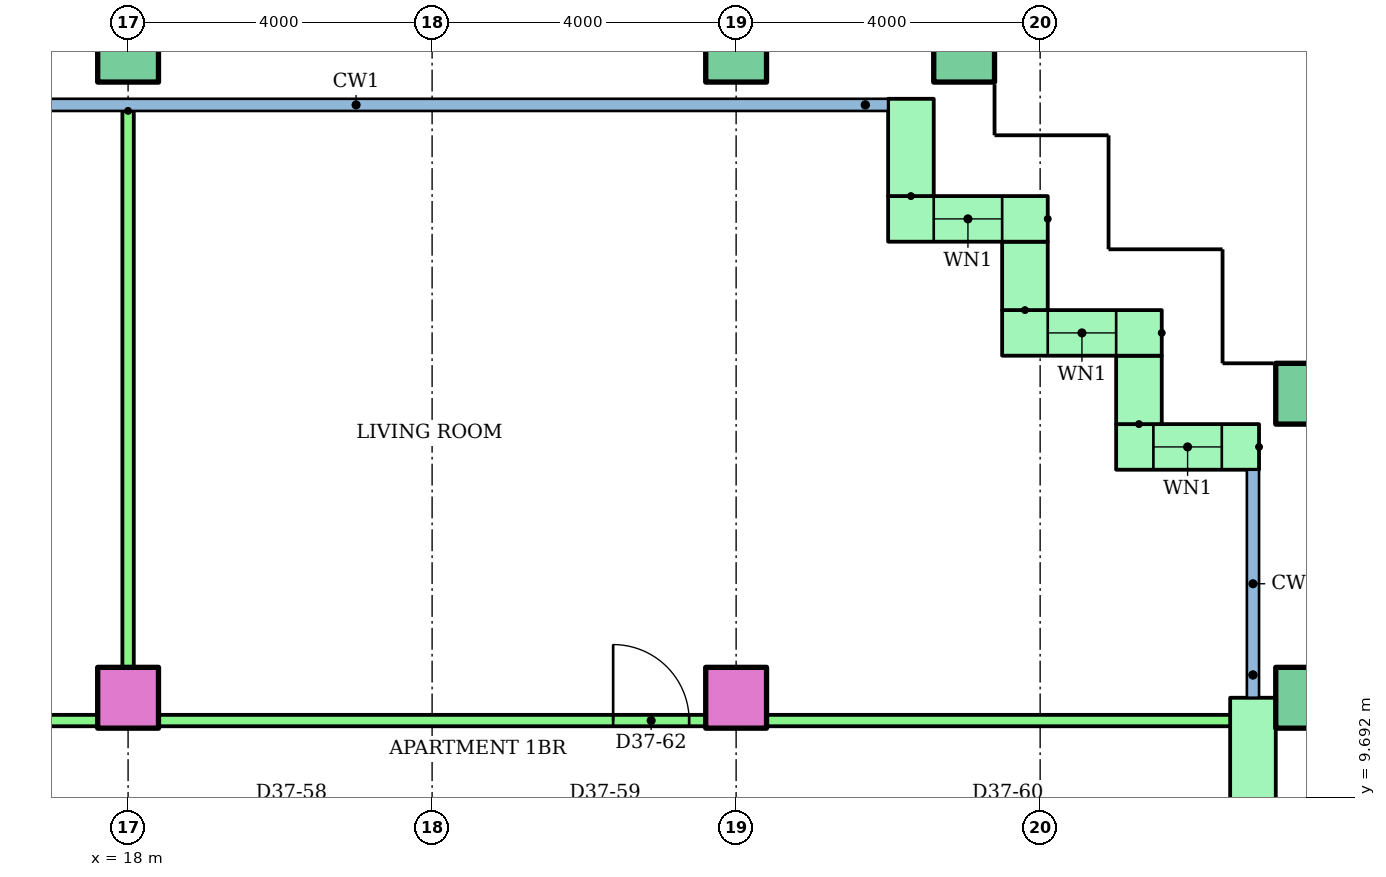
"""IFC4 building model, lengths in metres.
Left out: names, types, materials, properties, quantities, classifications, styles, units other than length and angle.
Written with IfcOpenShell. Run it as: python <this file> out.ifc"""

import sys

from ifc_helpers import new_model, si_unit, direction, frame, frame_2d, origin, origin_2d, place, context, subcontext, project, spatial, rectangle, hollow_rectangle, extrude, element, fill, save


model = new_model("IFC4")
c1 = context("Model", 3, precision=1e-05, world=origin(), true_north=direction((0.0, 1.0)))
c2 = subcontext(c1, "Body", "Model", "MODEL_VIEW")
j1 = project(units=[si_unit("LENGTHUNIT", "METRE"), si_unit("PLANEANGLEUNIT", "RADIAN")], contexts=[c1])
p1 = place(None, origin())
s1 = spatial("IfcSite", under=j1, at=p1, CompositionType="ELEMENT")
p2 = place(p1, origin())
s2 = spatial("IfcBuilding", under=s1, at=p2, CompositionType="ELEMENT")
p3 = place(p2, frame((0.0, 0.0, 142.2)))
s3 = spatial("IfcBuildingStorey", under=s2, at=p3, CompositionType="ELEMENT", Elevation=142.2)
for number, where in (
    (1, (18.0, 11.0, 0.0)),
    (2, (26.0, 11.0, 0.0)),
):
    element("IfcColumn", number, at=place(p3, frame(where)), inside=s3, PredefinedType="COLUMN", context=c2, shape_type="SweptSolid", body=[
        extrude(rectangle(XDim=0.8, YDim=0.8, at=origin_2d()), origin(), (0.0, 0.0, 1.0), 3.2),
    ])
for number, where in (
    (3, (33.5, 11.0, 0.0)),
    (4, (33.5, 15.0, 0.0)),
    (5, (18.0, 19.5, 0.0)),
    (6, (26.0, 19.5, 0.0)),
    (7, (29.0, 19.5, 0.0)),
):
    element("IfcColumn", number, at=place(p3, frame(where)), inside=s3, PredefinedType="COLUMN", context=c2, shape_type="SweptSolid", body=[
        extrude(hollow_rectangle(XDim=0.8, YDim=0.8, WallThickness=0.04, at=origin_2d()), origin(), (0.0, 0.0, 1.0), 3.2),
    ])
p4 = place(p3, frame((32.88, 14.3, 0.0), z_axis=(0.0, 0.0, 1.0), x_axis=(-1.0, 0.0, 0.0)))
e8 = element("IfcWall", 8, at=p4, inside=s3, PredefinedType="STANDARD", context=c2, shape_type="SweptSolid", body=[
    extrude(rectangle(XDim=1.88, YDim=0.6, at=frame_2d((0.94, 0.0))), origin(), (0.0, 0.0, 1.0), 2.92),
])
p5 = place(p4, frame((0.49, 0.0, 0.9)))
e9 = element("IfcOpeningElement", 9, at=p5, cuts=e8, PredefinedType="OPENING", context=c2, shape_type="SweptSolid", body=[
    extrude(rectangle(XDim=0.9, YDim=1.5, at=frame_2d((0.45, 0.75))), frame((0.0, 0.31, 0.0), z_axis=(0.0, -1.0, 0.0), x_axis=(1.0, 0.0, 0.0)), (0.0, 0.0, 1.0), 0.62),
])
p6 = place(p3, frame((31.3, 14.6, 0.0), z_axis=(0.0, 0.0, 1.0), x_axis=(0.0, 1.0, 0.0)))
e10 = element("IfcWall", 10, at=p6, inside=s3, PredefinedType="STANDARD", context=c2, shape_type="SweptSolid", body=[
    extrude(rectangle(XDim=0.9, YDim=0.6, at=frame_2d((0.45, 0.0))), origin(), (0.0, 0.0, 1.0), 2.92),
])
p7 = place(p3, frame((31.6, 15.8, 0.0), z_axis=(0.0, 0.0, 1.0), x_axis=(-1.0, 0.0, 0.0)))
e11 = element("IfcWall", 11, at=p7, inside=s3, PredefinedType="STANDARD", context=c2, shape_type="SweptSolid", body=[
    extrude(rectangle(XDim=2.1, YDim=0.6, at=frame_2d((1.05, 0.0))), origin(), (0.0, 0.0, 1.0), 2.92),
])
p8 = place(p7, frame((0.6, 0.0, 0.9)))
e12 = element("IfcOpeningElement", 12, at=p8, cuts=e11, PredefinedType="OPENING", context=c2, shape_type="SweptSolid", body=[
    extrude(rectangle(XDim=0.9, YDim=1.5, at=frame_2d((0.45, 0.75))), frame((0.0, 0.31, 0.0), z_axis=(0.0, -1.0, 0.0), x_axis=(1.0, 0.0, 0.0)), (0.0, 0.0, 1.0), 0.62),
])
p9 = place(p3, frame((29.8, 16.1, 0.0), z_axis=(0.0, 0.0, 1.0), x_axis=(0.0, 1.0, 0.0)))
e13 = element("IfcWall", 13, at=p9, inside=s3, PredefinedType="STANDARD", context=c2, shape_type="SweptSolid", body=[
    extrude(rectangle(XDim=0.9, YDim=0.6, at=frame_2d((0.45, 0.0))), origin(), (0.0, 0.0, 1.0), 2.92),
])
p10 = place(p3, frame((30.1, 17.3, 0.0), z_axis=(0.0, 0.0, 1.0), x_axis=(-1.0, 0.0, 0.0)))
e14 = element("IfcWall", 14, at=p10, inside=s3, PredefinedType="STANDARD", context=c2, shape_type="SweptSolid", body=[
    extrude(rectangle(XDim=2.1, YDim=0.6, at=frame_2d((1.05, 0.0))), origin(), (0.0, 0.0, 1.0), 2.92),
])
p11 = place(p10, frame((0.6, 0.0, 0.9)))
e15 = element("IfcOpeningElement", 15, at=p11, cuts=e14, PredefinedType="OPENING", context=c2, shape_type="SweptSolid", body=[
    extrude(rectangle(XDim=0.9, YDim=1.5, at=frame_2d((0.45, 0.75))), frame((0.0, 0.31, 0.0), z_axis=(0.0, -1.0, 0.0), x_axis=(1.0, 0.0, 0.0)), (0.0, 0.0, 1.0), 0.62),
])
p12 = place(p3, frame((28.3, 17.6, 0.0), z_axis=(0.0, 0.0, 1.0), x_axis=(0.0, 1.0, 0.0)))
e16 = element("IfcWall", 16, at=p12, inside=s3, PredefinedType="STANDARD", context=c2, shape_type="SweptSolid", body=[
    extrude(rectangle(XDim=1.28, YDim=0.6, at=frame_2d((0.64, 0.0))), origin(), (0.0, 0.0, 1.0), 2.92),
])
p13 = place(p3, frame((32.8, 6.5, 0.0), z_axis=(0.0, 0.0, 1.0), x_axis=(0.0, 1.0, 0.0)))
e17 = element("IfcWall", 17, at=p13, inside=s3, PredefinedType="STANDARD", context=c2, shape_type="SweptSolid", body=[
    extrude(rectangle(XDim=4.5, YDim=0.6, at=frame_2d((2.25, 0.0))), origin(), (0.0, 0.0, 1.0), 2.92),
])
p14 = place(p13, frame((1.325, 0.0, 0.0)))
e18 = element("IfcOpeningElement", 18, at=p14, cuts=e17, PredefinedType="OPENING", context=c2, shape_type="SweptSolid", body=[
    extrude(rectangle(XDim=1.2, YDim=2.1, at=frame_2d((0.6, 1.05))), frame((0.0, 0.31, 0.0), z_axis=(0.0, -1.0, 0.0), x_axis=(1.0, 0.0, 0.0)), (0.0, 0.0, 1.0), 0.62),
])
p15 = place(p3, frame((14.0, 10.7, 0.0)))
e19 = element("IfcWall", 19, at=p15, inside=s3, PredefinedType="PARTITIONING", context=c2, shape_type="SweptSolid", body=[
    extrude(rectangle(XDim=18.71, YDim=0.15, at=frame_2d((9.355, 0.0))), origin(), (0.0, 0.0, 1.0), 2.4),
])
p16 = place(p15, frame((1.55, 0.0, 0.0)))
e20 = element("IfcOpeningElement", 20, at=p16, cuts=e19, PredefinedType="OPENING", context=c2, shape_type="SweptSolid", body=[
    extrude(rectangle(XDim=0.9, YDim=2.1, at=frame_2d((0.45, 1.05))), frame((0.0, 0.085, 0.0), z_axis=(0.0, -1.0, 0.0), x_axis=(1.0, 0.0, 0.0)), (0.0, 0.0, 1.0), 0.17),
])
p17 = place(p15, frame((10.382, 0.0, 0.0)))
e21 = element("IfcOpeningElement", 21, at=p17, cuts=e19, PredefinedType="OPENING", context=c2, shape_type="SweptSolid", body=[
    extrude(rectangle(XDim=1.0, YDim=2.1, at=frame_2d((0.5, 1.05))), frame((0.0, 0.085, 0.0), z_axis=(0.0, -1.0, 0.0), x_axis=(1.0, 0.0, 0.0)), (0.0, 0.0, 1.0), 0.17),
])
p18 = place(p3, frame((18.0, 18.721, 0.0), z_axis=(0.0, 0.0, 1.0), x_axis=(0.0, -1.0, 0.0)))
e22 = element("IfcWall", 22, at=p18, inside=s3, PredefinedType="PARTITIONING", context=c2, shape_type="SweptSolid", body=[
    extrude(rectangle(XDim=8.021, YDim=0.15, at=frame_2d((4.01, 0.0))), origin(), (0.0, 0.0, 1.0), 2.4),
])
p19 = place(p5, origin())
e23 = element("IfcWindow", 23, at=p19, inside=s3, PartitioningType="SINGLE_PANEL", PredefinedType="WINDOW", context=c2, shape_type="SweptSolid", body=[
    extrude(rectangle(XDim=0.9, YDim=1.5, at=frame_2d((0.45, 0.75))), frame((0.0, 0.03, 0.0), z_axis=(0.0, -1.0, 0.0), x_axis=(1.0, 0.0, 0.0)), (0.0, 0.0, 1.0), 0.06),
])
fill(e9, e23)
p20 = place(p8, origin())
e24 = element("IfcWindow", 24, at=p20, inside=s3, PartitioningType="SINGLE_PANEL", PredefinedType="WINDOW", context=c2, shape_type="SweptSolid", body=[
    extrude(rectangle(XDim=0.9, YDim=1.5, at=frame_2d((0.45, 0.75))), frame((0.0, 0.03, 0.0), z_axis=(0.0, -1.0, 0.0), x_axis=(1.0, 0.0, 0.0)), (0.0, 0.0, 1.0), 0.06),
])
fill(e12, e24)
p21 = place(p11, origin())
e25 = element("IfcWindow", 25, at=p21, inside=s3, PartitioningType="SINGLE_PANEL", PredefinedType="WINDOW", context=c2, shape_type="SweptSolid", body=[
    extrude(rectangle(XDim=0.9, YDim=1.5, at=frame_2d((0.45, 0.75))), frame((0.0, 0.03, 0.0), z_axis=(0.0, -1.0, 0.0), x_axis=(1.0, 0.0, 0.0)), (0.0, 0.0, 1.0), 0.06),
])
fill(e15, e25)
p22 = place(p17, origin())
e26 = element("IfcDoor", 26, at=p22, inside=s3, OperationType="SINGLE_SWING_LEFT", PredefinedType="DOOR", context=c2, shape_type="SweptSolid", body=[
    extrude(rectangle(XDim=1.0, YDim=2.1, at=frame_2d((0.5, 1.05))), frame((0.0, 0.025, 0.0), z_axis=(0.0, -1.0, 0.0), x_axis=(1.0, 0.0, 0.0)), (0.0, 0.0, 1.0), 0.05),
])
fill(e21, e26)
save(model, sys.argv[1])
